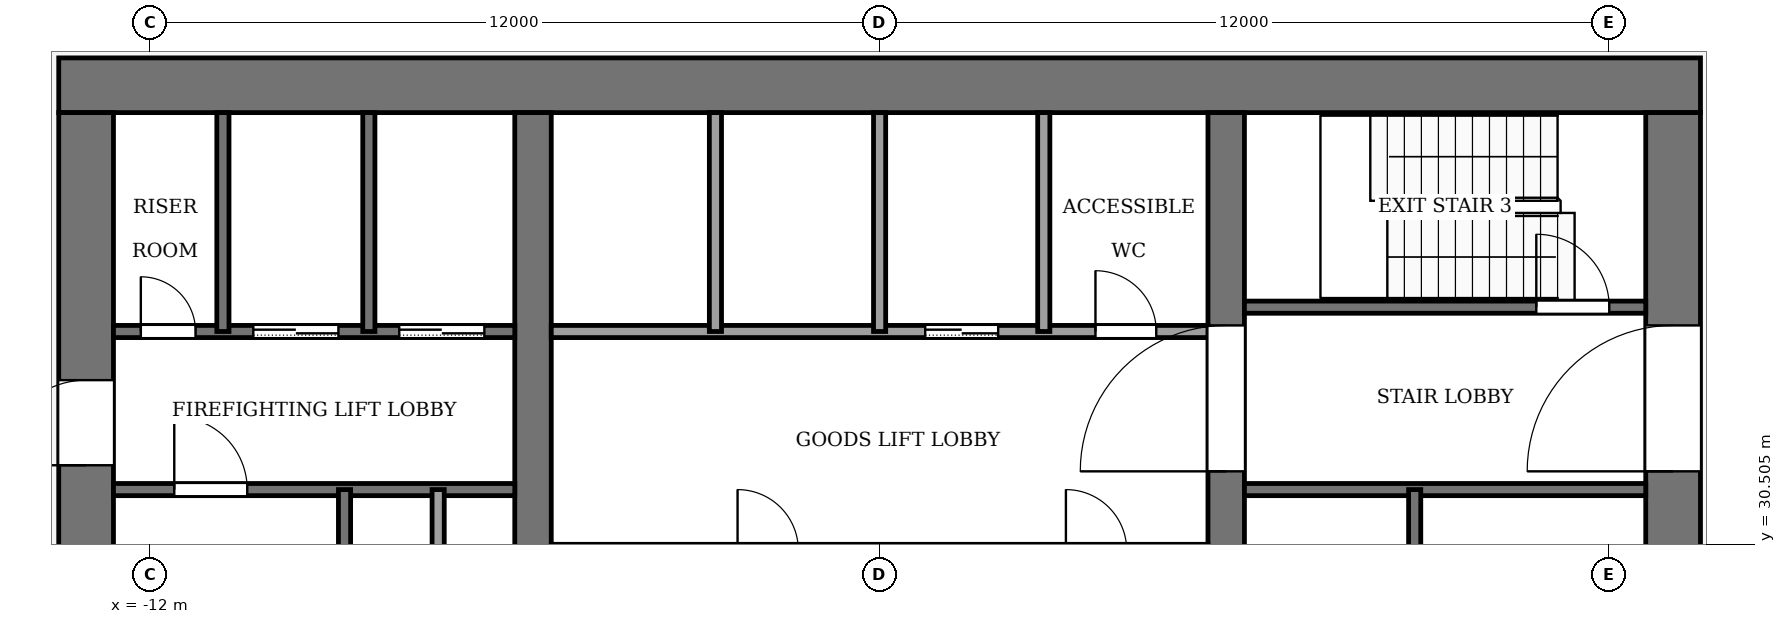
"""IFC4 building model, lengths in metres.
Left out: names, types, materials, properties, quantities, classifications, styles, units other than length and angle.
Written with IfcOpenShell. Run it as: python <this file> out.ifc"""

import sys

from ifc_helpers import new_model, si_unit, direction, frame, frame_2d, origin, place, context, subcontext, project, spatial, rectangle, extrude, element, fill, save


model = new_model("IFC4")
c1 = context("Model", 3, precision=1e-05, world=origin(), true_north=direction((0.0, 1.0)))
c2 = subcontext(c1, "Body", "Model", "MODEL_VIEW")
j1 = project(units=[si_unit("LENGTHUNIT", "METRE"), si_unit("PLANEANGLEUNIT", "RADIAN")], contexts=[c1])
p1 = place(None, origin())
s1 = spatial("IfcSite", under=j1, at=p1, CompositionType="ELEMENT")
p2 = place(p1, origin())
s2 = spatial("IfcBuilding", under=s1, at=p2, CompositionType="ELEMENT")
p3 = place(p2, frame((0.0, 0.0, 190.0)))
s3 = spatial("IfcBuildingStorey", under=s2, at=p3, CompositionType="ELEMENT", Elevation=190.0)
p4 = place(p3, frame((-13.5, 38.05, -0.13), z_axis=(0.0, 0.0, 1.0), x_axis=(1.0, 0.0, 0.0)))
e1 = element("IfcWall", 1, at=p4, inside=s3, PredefinedType="SHEAR", context=c2, shape_type="SweptSolid", body=[
    extrude(rectangle(XDim=27.0, YDim=0.9, at=frame_2d((13.5, 0.0))), origin(), (0.0, 0.0, 1.0), 4.0),
])
p5 = place(p3, frame((-13.05, 18.4, -0.13), z_axis=(0.0, 0.0, 1.0), x_axis=(0.0, 1.0, 0.0)))
e2 = element("IfcWall", 2, at=p5, inside=s3, PredefinedType="SHEAR", context=c2, shape_type="SweptSolid", body=[
    extrude(rectangle(XDim=19.2, YDim=0.9, at=frame_2d((9.6, 0.0))), origin(), (0.0, 0.0, 1.0), 4.0),
])
p6 = place(p5, frame((2.8, 0.0, 0.13)))
e3 = element("IfcOpeningElement", 3, at=p6, cuts=e2, PredefinedType="OPENING", context=c2, shape_type="SweptSolid", body=[
    extrude(rectangle(XDim=2.4, YDim=2.4, at=frame_2d((1.2, 1.2))), frame((0.0, 0.46, 0.0), z_axis=(0.0, -1.0, 0.0), x_axis=(1.0, 0.0, 0.0)), (0.0, 0.0, 1.0), 0.92),
])
p7 = place(p5, frame((13.4, 0.0, 0.13)))
e4 = element("IfcOpeningElement", 4, at=p7, cuts=e2, PredefinedType="OPENING", context=c2, shape_type="SweptSolid", body=[
    extrude(rectangle(XDim=1.4, YDim=2.2, at=frame_2d((0.7, 1.1))), frame((0.0, 0.46, 0.0), z_axis=(0.0, -1.0, 0.0), x_axis=(1.0, 0.0, 0.0)), (0.0, 0.0, 1.0), 0.92),
])
p8 = place(p3, frame((13.05, 18.4, -0.13), z_axis=(0.0, 0.0, 1.0), x_axis=(0.0, 1.0, 0.0)))
e5 = element("IfcWall", 5, at=p8, inside=s3, PredefinedType="SHEAR", context=c2, shape_type="SweptSolid", body=[
    extrude(rectangle(XDim=19.2, YDim=0.9, at=frame_2d((9.6, 0.0))), origin(), (0.0, 0.0, 1.0), 4.0),
])
p9 = place(p8, frame((2.8, 0.0, 0.13)))
e6 = element("IfcOpeningElement", 6, at=p9, cuts=e5, PredefinedType="OPENING", context=c2, shape_type="SweptSolid", body=[
    extrude(rectangle(XDim=2.4, YDim=2.4, at=frame_2d((1.2, 1.2))), frame((0.0, 0.46, 0.0), z_axis=(0.0, -1.0, 0.0), x_axis=(1.0, 0.0, 0.0)), (0.0, 0.0, 1.0), 0.92),
])
p10 = place(p8, frame((13.3, 0.0, 0.13)))
e7 = element("IfcOpeningElement", 7, at=p10, cuts=e5, PredefinedType="OPENING", context=c2, shape_type="SweptSolid", body=[
    extrude(rectangle(XDim=2.4, YDim=2.4, at=frame_2d((1.2, 1.2))), frame((0.0, 0.46, 0.0), z_axis=(0.0, -1.0, 0.0), x_axis=(1.0, 0.0, 0.0)), (0.0, 0.0, 1.0), 0.92),
])
p11 = place(p3, frame((-5.7, 18.4, -0.13), z_axis=(0.0, 0.0, 1.0), x_axis=(0.0, 1.0, 0.0)))
e8 = element("IfcWall", 8, at=p11, inside=s3, PredefinedType="SHEAR", context=c2, shape_type="SweptSolid", body=[
    extrude(rectangle(XDim=19.2, YDim=0.6, at=frame_2d((9.6, 0.0))), origin(), (0.0, 0.0, 1.0), 4.0),
])
p12 = place(p11, frame((8.35, 0.0, 0.13)))
e9 = element("IfcOpeningElement", 9, at=p12, cuts=e8, PredefinedType="OPENING", context=c2, shape_type="SweptSolid", body=[
    extrude(rectangle(XDim=0.9, YDim=2.1, at=frame_2d((0.45, 1.05))), frame((0.0, 0.31, 0.0), z_axis=(0.0, -1.0, 0.0), x_axis=(1.0, 0.0, 0.0)), (0.0, 0.0, 1.0), 0.62),
])
p13 = place(p3, frame((5.7, 18.4, -0.13), z_axis=(0.0, 0.0, 1.0), x_axis=(0.0, 1.0, 0.0)))
e10 = element("IfcWall", 10, at=p13, inside=s3, PredefinedType="SHEAR", context=c2, shape_type="SweptSolid", body=[
    extrude(rectangle(XDim=19.2, YDim=0.6, at=frame_2d((9.6, 0.0))), origin(), (0.0, 0.0, 1.0), 4.0),
])
p14 = place(p13, frame((8.35, 0.0, 0.13)))
e11 = element("IfcOpeningElement", 11, at=p14, cuts=e10, PredefinedType="OPENING", context=c2, shape_type="SweptSolid", body=[
    extrude(rectangle(XDim=0.9, YDim=2.1, at=frame_2d((0.45, 1.05))), frame((0.0, 0.31, 0.0), z_axis=(0.0, -1.0, 0.0), x_axis=(1.0, 0.0, 0.0)), (0.0, 0.0, 1.0), 0.62),
])
p15 = place(p13, frame((13.3, 0.0, 0.13)))
e12 = element("IfcOpeningElement", 12, at=p15, cuts=e10, PredefinedType="OPENING", context=c2, shape_type="SweptSolid", body=[
    extrude(rectangle(XDim=2.4, YDim=2.4, at=frame_2d((1.2, 1.2))), frame((0.0, 0.31, 0.0), z_axis=(0.0, -1.0, 0.0), x_axis=(1.0, 0.0, 0.0)), (0.0, 0.0, 1.0), 0.62),
])
p16 = place(p3, frame((-12.6, 31.4, 0.0), z_axis=(0.0, 0.0, 1.0), x_axis=(1.0, 0.0, 0.0)))
e13 = element("IfcWall", 13, at=p16, inside=s3, PredefinedType="PARTITIONING", context=c2, shape_type="SweptSolid", body=[
    extrude(rectangle(XDim=6.6, YDim=0.2, at=frame_2d((3.3, 0.0))), origin(), (0.0, 0.0, 1.0), 3.87),
])
p17 = place(p16, frame((1.0, 0.0, 0.0)))
e14 = element("IfcOpeningElement", 14, at=p17, cuts=e13, PredefinedType="OPENING", context=c2, shape_type="SweptSolid", body=[
    extrude(rectangle(XDim=1.2, YDim=2.2, at=frame_2d((0.6, 1.1))), frame((0.0, 0.11, 0.0), z_axis=(0.0, -1.0, 0.0), x_axis=(1.0, 0.0, 0.0)), (0.0, 0.0, 1.0), 0.22),
])
p18 = place(p3, frame((6.0, 31.4, 0.0), z_axis=(0.0, 0.0, 1.0), x_axis=(1.0, 0.0, 0.0)))
e15 = element("IfcWall", 15, at=p18, inside=s3, PredefinedType="PARTITIONING", context=c2, shape_type="SweptSolid", body=[
    extrude(rectangle(XDim=6.6, YDim=0.2, at=frame_2d((3.3, 0.0))), origin(), (0.0, 0.0, 1.0), 3.87),
])
p19 = place(p3, frame((-12.6, 34.0, 0.0), z_axis=(0.0, 0.0, 1.0), x_axis=(1.0, 0.0, 0.0)))
e16 = element("IfcWall", 16, at=p19, inside=s3, PredefinedType="PARTITIONING", context=c2, shape_type="SweptSolid", body=[
    extrude(rectangle(XDim=6.6, YDim=0.2, at=frame_2d((3.3, 0.0))), origin(), (0.0, 0.0, 1.0), 3.87),
])
p20 = place(p19, frame((4.7, 0.0, 0.0)))
e17 = element("IfcOpeningElement", 17, at=p20, cuts=e16, PredefinedType="OPENING", context=c2, shape_type="SweptSolid", body=[
    extrude(rectangle(XDim=1.4, YDim=2.2, at=frame_2d((0.7, 1.1))), frame((0.0, 0.11, 0.0), z_axis=(0.0, -1.0, 0.0), x_axis=(1.0, 0.0, 0.0)), (0.0, 0.0, 1.0), 0.22),
])
p21 = place(p19, frame((2.3, 0.0, 0.0)))
e18 = element("IfcOpeningElement", 18, at=p21, cuts=e16, PredefinedType="OPENING", context=c2, shape_type="SweptSolid", body=[
    extrude(rectangle(XDim=1.4, YDim=2.2, at=frame_2d((0.7, 1.1))), frame((0.0, 0.11, 0.0), z_axis=(0.0, -1.0, 0.0), x_axis=(1.0, 0.0, 0.0)), (0.0, 0.0, 1.0), 0.22),
])
p22 = place(p19, frame((0.45, 0.0, 0.0)))
e19 = element("IfcOpeningElement", 19, at=p22, cuts=e16, PredefinedType="OPENING", context=c2, shape_type="SweptSolid", body=[
    extrude(rectangle(XDim=0.9, YDim=2.1, at=frame_2d((0.45, 1.05))), frame((0.0, 0.11, 0.0), z_axis=(0.0, -1.0, 0.0), x_axis=(1.0, 0.0, 0.0)), (0.0, 0.0, 1.0), 0.22),
])
p23 = place(p3, frame((-5.4, 34.0, 0.0), z_axis=(0.0, 0.0, 1.0), x_axis=(1.0, 0.0, 0.0)))
e20 = element("IfcWall", 20, at=p23, inside=s3, PredefinedType="PARTITIONING", context=c2, shape_type="SweptSolid", body=[
    extrude(rectangle(XDim=10.8, YDim=0.2, at=frame_2d((5.4, 0.0))), origin(), (0.0, 0.0, 1.0), 3.87),
])
p24 = place(p23, frame((6.15, 0.0, 0.0)))
e21 = element("IfcOpeningElement", 21, at=p24, cuts=e20, PredefinedType="OPENING", context=c2, shape_type="SweptSolid", body=[
    extrude(rectangle(XDim=1.2, YDim=2.2, at=frame_2d((0.6, 1.1))), frame((0.0, 0.11, 0.0), z_axis=(0.0, -1.0, 0.0), x_axis=(1.0, 0.0, 0.0)), (0.0, 0.0, 1.0), 0.22),
])
p25 = place(p23, frame((8.95, 0.0, 0.0)))
e22 = element("IfcOpeningElement", 22, at=p25, cuts=e20, PredefinedType="OPENING", context=c2, shape_type="SweptSolid", body=[
    extrude(rectangle(XDim=1.0, YDim=2.1, at=frame_2d((0.5, 1.05))), frame((0.0, 0.11, 0.0), z_axis=(0.0, -1.0, 0.0), x_axis=(1.0, 0.0, 0.0)), (0.0, 0.0, 1.0), 0.22),
])
p26 = place(p3, frame((6.0, 34.4, 0.0), z_axis=(0.0, 0.0, 1.0), x_axis=(1.0, 0.0, 0.0)))
e23 = element("IfcWall", 23, at=p26, inside=s3, PredefinedType="PARTITIONING", context=c2, shape_type="SweptSolid", body=[
    extrude(rectangle(XDim=6.6, YDim=0.2, at=frame_2d((3.3, 0.0))), origin(), (0.0, 0.0, 1.0), 3.87),
])
p27 = place(p26, frame((4.8, 0.0, 0.0)))
e24 = element("IfcOpeningElement", 24, at=p27, cuts=e23, PredefinedType="OPENING", context=c2, shape_type="SweptSolid", body=[
    extrude(rectangle(XDim=1.2, YDim=2.2, at=frame_2d((0.6, 1.1))), frame((0.0, 0.11, 0.0), z_axis=(0.0, -1.0, 0.0), x_axis=(1.0, 0.0, 0.0)), (0.0, 0.0, 1.0), 0.22),
])
p28 = place(p3, frame((-10.8, 34.0, 0.0), z_axis=(0.0, 0.0, 1.0), x_axis=(0.0, 1.0, 0.0)))
e25 = element("IfcWall", 25, at=p28, inside=s3, PredefinedType="PARTITIONING", context=c2, shape_type="SweptSolid", body=[
    extrude(rectangle(XDim=3.6, YDim=0.2, at=frame_2d((1.8, 0.0))), origin(), (0.0, 0.0, 1.0), 3.87),
])
p29 = place(p3, frame((-8.8, 24.0, 0.0), z_axis=(0.0, 0.0, 1.0), x_axis=(0.0, 1.0, 0.0)))
e26 = element("IfcWall", 26, at=p29, inside=s3, PredefinedType="PARTITIONING", context=c2, shape_type="SweptSolid", body=[
    extrude(rectangle(XDim=7.4, YDim=0.2, at=frame_2d((3.7, 0.0))), origin(), (0.0, 0.0, 1.0), 3.87),
])
p30 = place(p3, frame((-8.4, 34.0, 0.0), z_axis=(0.0, 0.0, 1.0), x_axis=(0.0, 1.0, 0.0)))
e27 = element("IfcWall", 27, at=p30, inside=s3, PredefinedType="PARTITIONING", context=c2, shape_type="SweptSolid", body=[
    extrude(rectangle(XDim=3.6, YDim=0.2, at=frame_2d((1.8, 0.0))), origin(), (0.0, 0.0, 1.0), 3.87),
])
p31 = place(p3, frame((-7.26, 24.0, 0.0), z_axis=(0.0, 0.0, 1.0), x_axis=(0.0, 1.0, 0.0)))
e28 = element("IfcWall", 28, at=p31, inside=s3, PredefinedType="PARTITIONING", context=c2, shape_type="SweptSolid", body=[
    extrude(rectangle(XDim=7.4, YDim=0.2, at=frame_2d((3.7, 0.0))), origin(), (0.0, 0.0, 1.0), 3.87),
])
for number, where, z_axis, x_axis in (
    (29, (-2.7, 34.0, 0.0), (0.0, 0.0, 1.0), (0.0, 1.0, 0.0)),
    (30, (0.0, 34.0, 0.0), (0.0, 0.0, 1.0), (0.0, 1.0, 0.0)),
    (31, (2.7, 34.0, 0.0), (0.0, 0.0, 1.0), (0.0, 1.0, 0.0)),
):
    element("IfcWall", number, at=place(p3, frame(where, z_axis=z_axis, x_axis=x_axis)), inside=s3, PredefinedType="PARTITIONING", context=c2, shape_type="SweptSolid", body=[
        extrude(rectangle(XDim=3.6, YDim=0.2, at=frame_2d((1.8, 0.0))), origin(), (0.0, 0.0, 1.0), 3.87),
    ])
p32 = place(p3, frame((8.8, 24.0, 0.0), z_axis=(0.0, 0.0, 1.0), x_axis=(0.0, 1.0, 0.0)))
e32 = element("IfcWall", 32, at=p32, inside=s3, PredefinedType="PARTITIONING", context=c2, shape_type="SweptSolid", body=[
    extrude(rectangle(XDim=7.4, YDim=0.2, at=frame_2d((3.7, 0.0))), origin(), (0.0, 0.0, 1.0), 3.87),
])
p33 = place(p24, origin())
e33 = element("IfcDoor", 33, at=p33, inside=s3, OperationType="SLIDING_TO_LEFT", PredefinedType="DOOR", context=c2, shape_type="SweptSolid", body=[
    extrude(rectangle(XDim=1.2, YDim=2.2, at=frame_2d((0.6, 1.1))), frame((0.0, 0.025, 0.0), z_axis=(0.0, -1.0, 0.0), x_axis=(1.0, 0.0, 0.0)), (0.0, 0.0, 1.0), 0.05),
])
fill(e21, e33)
p34 = place(p20, origin())
e34 = element("IfcDoor", 34, at=p34, inside=s3, OperationType="SLIDING_TO_LEFT", PredefinedType="DOOR", context=c2, shape_type="SweptSolid", body=[
    extrude(rectangle(XDim=1.4, YDim=2.2, at=frame_2d((0.7, 1.1))), frame((0.0, 0.025, 0.0), z_axis=(0.0, -1.0, 0.0), x_axis=(1.0, 0.0, 0.0)), (0.0, 0.0, 1.0), 0.05),
])
fill(e17, e34)
p35 = place(p21, origin())
e35 = element("IfcDoor", 35, at=p35, inside=s3, OperationType="SLIDING_TO_LEFT", PredefinedType="DOOR", context=c2, shape_type="SweptSolid", body=[
    extrude(rectangle(XDim=1.4, YDim=2.2, at=frame_2d((0.7, 1.1))), frame((0.0, 0.025, 0.0), z_axis=(0.0, -1.0, 0.0), x_axis=(1.0, 0.0, 0.0)), (0.0, 0.0, 1.0), 0.05),
])
fill(e18, e35)
p36 = place(p22, origin())
e36 = element("IfcDoor", 36, at=p36, inside=s3, OperationType="SINGLE_SWING_RIGHT", PredefinedType="DOOR", context=c2, shape_type="SweptSolid", body=[
    extrude(rectangle(XDim=0.9, YDim=2.1, at=frame_2d((0.45, 1.05))), frame((0.0, 0.025, 0.0), z_axis=(0.0, -1.0, 0.0), x_axis=(1.0, 0.0, 0.0)), (0.0, 0.0, 1.0), 0.05),
])
fill(e19, e36)
p37 = place(p25, origin())
e37 = element("IfcDoor", 37, at=p37, inside=s3, OperationType="SINGLE_SWING_LEFT", PredefinedType="DOOR", context=c2, shape_type="SweptSolid", body=[
    extrude(rectangle(XDim=1.0, YDim=2.1, at=frame_2d((0.5, 1.05))), frame((0.0, 0.025, 0.0), z_axis=(0.0, -1.0, 0.0), x_axis=(1.0, 0.0, 0.0)), (0.0, 0.0, 1.0), 0.05),
])
fill(e22, e37)
p38 = place(p17, origin())
e38 = element("IfcDoor", 38, at=p38, inside=s3, OperationType="SINGLE_SWING_RIGHT", PredefinedType="DOOR", context=c2, shape_type="SweptSolid", body=[
    extrude(rectangle(XDim=1.2, YDim=2.2, at=frame_2d((0.6, 1.1))), frame((0.0, 0.025, 0.0), z_axis=(0.0, -1.0, 0.0), x_axis=(1.0, 0.0, 0.0)), (0.0, 0.0, 1.0), 0.05),
])
fill(e14, e38)
p39 = place(p27, origin())
e39 = element("IfcDoor", 39, at=p39, inside=s3, OperationType="SINGLE_SWING_RIGHT", PredefinedType="DOOR", context=c2, shape_type="SweptSolid", body=[
    extrude(rectangle(XDim=1.2, YDim=2.2, at=frame_2d((0.6, 1.1))), frame((0.0, 0.025, 0.0), z_axis=(0.0, -1.0, 0.0), x_axis=(1.0, 0.0, 0.0)), (0.0, 0.0, 1.0), 0.05),
])
fill(e24, e39)
p40 = place(p15, origin())
e40 = element("IfcDoor", 40, at=p40, inside=s3, OperationType="DOUBLE_DOOR_SINGLE_SWING", PredefinedType="DOOR", context=c2, shape_type="SweptSolid", body=[
    extrude(rectangle(XDim=2.4, YDim=2.4, at=frame_2d((1.2, 1.2))), frame((0.0, 0.025, 0.0), z_axis=(0.0, -1.0, 0.0), x_axis=(1.0, 0.0, 0.0)), (0.0, 0.0, 1.0), 0.05),
])
fill(e12, e40)
p41 = place(p10, origin())
e41 = element("IfcDoor", 41, at=p41, inside=s3, OperationType="DOUBLE_DOOR_SINGLE_SWING", PredefinedType="DOOR", context=c2, shape_type="SweptSolid", body=[
    extrude(rectangle(XDim=2.4, YDim=2.4, at=frame_2d((1.2, 1.2))), frame((0.0, 0.025, 0.0), z_axis=(0.0, -1.0, 0.0), x_axis=(1.0, 0.0, 0.0)), (0.0, 0.0, 1.0), 0.05),
])
fill(e7, e41)
p42 = place(p7, origin())
e42 = element("IfcDoor", 42, at=p42, inside=s3, OperationType="SINGLE_SWING_RIGHT", PredefinedType="DOOR", context=c2, shape_type="SweptSolid", body=[
    extrude(rectangle(XDim=1.4, YDim=2.2, at=frame_2d((0.7, 1.1))), frame((0.0, 0.025, 0.0), z_axis=(0.0, -1.0, 0.0), x_axis=(1.0, 0.0, 0.0)), (0.0, 0.0, 1.0), 0.05),
])
fill(e4, e42)
save(model, sys.argv[1])
